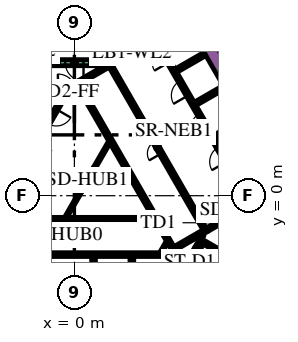
"""IFC4 building model, lengths in metres.
Left out: names, types, materials, properties, quantities, classifications, styles, units other than length and angle.
Written with IfcOpenShell. Run it as: python <this file> out.ifc"""

import sys

from ifc_helpers import new_model, si_unit, direction, frame, frame_2d, origin, place, context, subcontext, project, spatial, polyline, rectangle, outline, extrude, element, fill, save


model = new_model("IFC4")
c1 = context("Model", 3, precision=1e-05, world=origin(), true_north=direction((0.0, 1.0)))
c2 = subcontext(c1, "Body", "Model", "MODEL_VIEW")
j1 = project(units=[si_unit("LENGTHUNIT", "METRE"), si_unit("PLANEANGLEUNIT", "RADIAN")], contexts=[c1])
p1 = place(None, origin())
s1 = spatial("IfcSite", under=j1, at=p1, CompositionType="ELEMENT")
p2 = place(p1, origin())
s2 = spatial("IfcBuilding", under=s1, at=p2, CompositionType="ELEMENT")
p3 = place(p2, frame((0.0, 0.0, 21.6)))
s3 = spatial("IfcBuildingStorey", under=s2, at=p3, CompositionType="ELEMENT", Elevation=21.6)
p4 = place(p3, frame((6.776, 13.364, 0.0), z_axis=(0.0, 0.0, 1.0), x_axis=(0.500004177138, -0.8660229921, 0.0)))
e1 = element("IfcWall", 1, at=p4, inside=s3, PredefinedType="SOLIDWALL", context=c2, shape_type="SweptSolid", body=[
    extrude(rectangle(XDim=20.204, YDim=0.9, at=frame_2d((10.102, 0.0))), origin(), (0.0, 0.0, 1.0), 6.0),
])
p5 = place(p3, frame((8.334, -2.964, 0.0), z_axis=(0.0, 0.0, 1.0), x_axis=(0.866016039709, -0.500016218704, 0.0)))
e2 = element("IfcWall", 2, at=p5, inside=s3, PredefinedType="SOLIDWALL", context=c2, shape_type="SweptSolid", body=[
    extrude(rectangle(XDim=7.05, YDim=0.25, at=frame_2d((3.525, 0.0))), origin(), (0.0, 0.0, 1.0), 6.0),
])
p6 = place(p3, frame((8.168, -3.503, 0.0), z_axis=(0.0, 0.0, 1.0), x_axis=(0.49972245349, 0.866185586049, 0.0)))
e3 = element("IfcWall", 3, at=p6, inside=s3, PredefinedType="SOLIDWALL", context=c2, shape_type="SweptSolid", body=[
    extrude(rectangle(XDim=0.425, YDim=0.25, at=frame_2d((0.212, 0.0))), origin(), (0.0, 0.0, 1.0), 6.0),
])
p7 = place(p3, frame((1.6, 8.95, 0.0), z_axis=(0.0, 0.0, 1.0), x_axis=(0.0, 1.0, 0.0)))
e4 = element("IfcWall", 4, at=p7, inside=s3, PredefinedType="SOLIDWALL", context=c2, shape_type="SweptSolid", body=[
    extrude(rectangle(XDim=6.8, YDim=0.25, at=frame_2d((3.4, 0.0))), origin(), (0.0, 0.0, 1.0), 6.0),
])
p8 = place(p3, frame((1.05, 8.825, 0.0), z_axis=(0.0, 0.0, 1.0), x_axis=(1.0, 0.0, 0.0)))
e5 = element("IfcWall", 5, at=p8, inside=s3, PredefinedType="SOLIDWALL", context=c2, shape_type="SweptSolid", body=[
    extrude(rectangle(XDim=0.675, YDim=0.25, at=frame_2d((0.337, 0.0))), origin(), (0.0, 0.0, 1.0), 6.0),
])
p9 = place(p3, frame((-1.6, 8.7, 0.0), z_axis=(0.0, 0.0, 1.0), x_axis=(0.0, 1.0, 0.0)))
e6 = element("IfcWall", 6, at=p9, inside=s3, PredefinedType="SOLIDWALL", context=c2, shape_type="SweptSolid", body=[
    extrude(rectangle(XDim=7.05, YDim=0.25, at=frame_2d((3.525, 0.0))), origin(), (0.0, 0.0, 1.0), 6.0),
])
p10 = place(p3, frame((-1.475, 8.825, 0.0), z_axis=(0.0, 0.0, 1.0), x_axis=(1.0, 0.0, 0.0)))
e7 = element("IfcWall", 7, at=p10, inside=s3, PredefinedType="SOLIDWALL", context=c2, shape_type="SweptSolid", body=[
    extrude(rectangle(XDim=0.425, YDim=0.25, at=frame_2d((0.212, 0.0))), origin(), (0.0, 0.0, 1.0), 6.0),
])
p11 = place(p3, frame((-5.545, -3.875, 0.0), z_axis=(0.0, 0.0, 1.0), x_axis=(1.0, 0.0, 0.0)))
e8 = element("IfcWall", 8, at=p11, inside=s3, PredefinedType="SOLIDWALL", context=c2, shape_type="SweptSolid", body=[
    extrude(rectangle(XDim=11.97, YDim=0.25, at=frame_2d((5.985, 0.0))), origin(), (0.0, 0.0, 1.0), 6.0),
])
p12 = place(p3, frame((6.3, -7.268, 0.0), z_axis=(0.0, 0.0, 1.0), x_axis=(0.0, 1.0, 0.0)))
e9 = element("IfcWall", 9, at=p12, inside=s3, PredefinedType="SOLIDWALL", context=c2, shape_type="SweptSolid", body=[
    extrude(rectangle(XDim=3.268, YDim=0.25, at=frame_2d((1.634, 0.0))), origin(), (0.0, 0.0, 1.0), 6.0),
])
for number, where, z_axis, x_axis in (
    (10, (3.78, -4.0, 0.0), (0.0, 0.0, 1.0), (0.0, -1.0, 0.0)),
    (11, (1.26, -4.0, 0.0), (0.0, 0.0, 1.0), (0.0, -1.0, 0.0)),
):
    element("IfcWall", number, at=place(p3, frame(where, z_axis=z_axis, x_axis=x_axis)), inside=s3, PredefinedType="SOLIDWALL", context=c2, shape_type="SweptSolid", body=[
        extrude(rectangle(XDim=2.2, YDim=0.25, at=frame_2d((1.1, 0.0))), origin(), (0.0, 0.0, 1.0), 6.0),
    ])
p13 = place(p3, origin())
e12 = element("IfcWall", 12, at=p13, inside=s3, PredefinedType="SOLIDWALL", context=c2, shape_type="SweptSolid", body=[
    extrude(outline(polyline([(0.566, 6.725), (0.566, 6.875), (0.566, 6.875), (0.565, 6.875), (0.361, 6.875), (0.035, 7.439), (0.252, 7.564), (0.377, 7.348), (6.552, -3.348), (6.677, -3.564), (6.46, -3.689), (0.448, 6.725), (0.565, 6.725), (0.566, 6.725), (0.566, 6.725)])), origin(), (0.0, 0.0, 1.0), 6.0),
])
p14 = place(p3, frame((0.314, 7.456, 0.0), z_axis=(0.0, 0.0, 1.0), x_axis=(0.866013897511, 0.50001992892, 0.0)))
e13 = element("IfcWall", 13, at=p14, inside=s3, PredefinedType="SOLIDWALL", context=c2, shape_type="SweptSolid", body=[
    extrude(rectangle(XDim=3.268, YDim=0.25, at=frame_2d((1.634, 0.0))), origin(), (0.0, 0.0, 1.0), 6.0),
])
p15 = place(p3, frame((6.614, -3.456, 0.0), z_axis=(0.0, 0.0, 1.0), x_axis=(0.866031582473, 0.499989298045, 0.0)))
e14 = element("IfcWall", 14, at=p15, inside=s3, PredefinedType="SOLIDWALL", context=c2, shape_type="SweptSolid", body=[
    extrude(rectangle(XDim=2.455, YDim=0.25, at=frame_2d((1.228, 0.0))), origin(), (0.0, 0.0, 1.0), 6.0),
])
for number, where, z_axis, x_axis in (
    (15, (6.684, 8.224, 0.0), (0.0, 0.0, 1.0), (0.866, 0.5, 0.0)),
    (16, (7.944, 6.041, 0.0), (0.0, 0.0, 1.0), (0.866, 0.5, 0.0)),
    (17, (9.204, 3.859, 0.0), (0.0, 0.0, 1.0), (0.866, 0.5, 0.0)),
):
    element("IfcWall", number, at=place(p3, frame(where, z_axis=z_axis, x_axis=x_axis)), inside=s3, PredefinedType="SOLIDWALL", context=c2, shape_type="SweptSolid", body=[
        extrude(rectangle(XDim=2.2, YDim=0.25, at=frame_2d((1.1, 0.0))), origin(), (0.0, 0.0, 1.0), 6.0),
    ])
p16 = place(p3, frame((-0.728, 6.24, 0.0), z_axis=(0.0, 0.0, 1.0), x_axis=(-0.865955664968, 0.500120771724, 0.0)))
e18 = element("IfcWall", 18, at=p16, inside=s3, PredefinedType="SOLIDWALL", context=c2, shape_type="SweptSolid", body=[
    extrude(rectangle(XDim=0.778, YDim=0.25, at=frame_2d((0.389, 0.0))), origin(), (0.0, 0.0, 1.0), 6.0),
])
p17 = place(p3, frame((-2.196, 8.625, 0.0), z_axis=(0.0, 0.0, 1.0), x_axis=(1.0, 0.0, 0.0)))
e19 = element("IfcWall", 19, at=p17, inside=s3, PredefinedType="PARTITIONING", context=c2, shape_type="SweptSolid", body=[
    extrude(rectangle(XDim=1.146, YDim=0.15, at=frame_2d((0.573, 0.0))), origin(), (0.0, 0.0, 1.0), 4.85),
])
p18 = place(p3, frame((5.705, -3.718, 0.0), z_axis=(0.0, 0.0, 1.0), x_axis=(0.499962090823, 0.866047289552, 0.0)))
e20 = element("IfcWall", 20, at=p18, inside=s3, PredefinedType="PARTITIONING", context=c2, shape_type="SweptSolid", body=[
    extrude(rectangle(XDim=0.735, YDim=0.15, at=frame_2d((0.367, 0.0))), origin(), (0.0, 0.0, 1.0), 4.85),
])
p19 = place(p3, frame((8.459, -2.599, 0.0), z_axis=(0.0, 0.0, 1.0), x_axis=(-0.500041054325, -0.866001699761, 0.0)))
e21 = element("IfcWall", 21, at=p19, inside=s3, PredefinedType="PARTITIONING", context=c2, shape_type="SweptSolid", body=[
    extrude(rectangle(XDim=0.929, YDim=0.15, at=frame_2d((0.464, 0.0))), origin(), (0.0, 0.0, 1.0), 6.0),
])
p20 = place(p3, frame((-4.2, -1.5, 0.0), z_axis=(0.0, 0.0, 1.0), x_axis=(1.0, 0.0, 0.0)))
e22 = element("IfcWall", 22, at=p20, inside=s3, PredefinedType="PARTITIONING", context=c2, shape_type="SweptSolid", body=[
    extrude(rectangle(XDim=9.359, YDim=0.15, at=frame_2d((4.68, 0.0))), origin(), (0.0, 0.0, 1.0), 4.85),
])
p21 = place(p3, frame((-0.544, -1.393, 0.0), z_axis=(0.0, 0.0, 1.0), x_axis=(0.499928740635, 0.866066541489, 0.0)))
e23 = element("IfcWall", 23, at=p21, inside=s3, PredefinedType="PARTITIONING", context=c2, shape_type="SweptSolid", body=[
    extrude(rectangle(XDim=1.912, YDim=0.15, at=frame_2d((0.956, 0.0))), origin(), (0.0, 0.0, 1.0), 4.85),
])
p22 = place(p3, frame((1.312, 1.822, 0.0), z_axis=(0.0, 0.0, 1.0), x_axis=(0.500003549559, 0.866023354436, 0.0)))
e24 = element("IfcWall", 24, at=p22, inside=s3, PredefinedType="PARTITIONING", context=c2, shape_type="SweptSolid", body=[
    extrude(rectangle(XDim=1.93, YDim=0.15, at=frame_2d((0.965, 0.0))), origin(), (0.0, 0.0, 1.0), 4.85),
])
p23 = place(p3, frame((1.05, 8.625, 0.0), z_axis=(0.0, 0.0, 1.0), x_axis=(1.0, 0.0, 0.0)))
e25 = element("IfcWall", 25, at=p23, inside=s3, PredefinedType="PARTITIONING", context=c2, shape_type="SweptSolid", body=[
    extrude(rectangle(XDim=0.514, YDim=0.15, at=frame_2d((0.257, 0.0))), origin(), (0.0, 0.0, 1.0), 4.85),
])
p24 = place(p3, frame((11.553, -0.46, 0.0), z_axis=(0.0, 0.0, 1.0), x_axis=(-0.500006514828, 0.866021642414, 0.0)))
e26 = element("IfcWall", 26, at=p24, inside=s3, PredefinedType="SOLIDWALL", context=c2, shape_type="SweptSolid", body=[
    extrude(rectangle(XDim=12.35, YDim=0.25, at=frame_2d((6.175, 0.0))), origin(), (0.0, 0.0, 1.0), 6.0),
])
p25 = place(p24, frame((0.585, 0.0, 0.0)))
e27 = element("IfcOpeningElement", 27, at=p25, cuts=e26, PredefinedType="OPENING", context=c2, shape_type="SweptSolid", body=[
    extrude(rectangle(XDim=1.1, YDim=2.1, at=frame_2d((0.55, 1.05))), frame((0.0, 0.135, 0.0), z_axis=(0.0, -1.0, 0.0), x_axis=(1.0, 0.0, 0.0)), (0.0, 0.0, 1.0), 0.27),
])
p26 = place(p24, frame((3.105, 0.0, 0.0)))
e28 = element("IfcOpeningElement", 28, at=p26, cuts=e26, PredefinedType="OPENING", context=c2, shape_type="SweptSolid", body=[
    extrude(rectangle(XDim=1.1, YDim=2.1, at=frame_2d((0.55, 1.05))), frame((0.0, 0.135, 0.0), z_axis=(0.0, -1.0, 0.0), x_axis=(1.0, 0.0, 0.0)), (0.0, 0.0, 1.0), 0.27),
])
p27 = place(p24, frame((5.625, 0.0, 0.0)))
e29 = element("IfcOpeningElement", 29, at=p27, cuts=e26, PredefinedType="OPENING", context=c2, shape_type="SweptSolid", body=[
    extrude(rectangle(XDim=1.1, YDim=2.1, at=frame_2d((0.55, 1.05))), frame((0.0, 0.135, 0.0), z_axis=(0.0, -1.0, 0.0), x_axis=(1.0, 0.0, 0.0)), (0.0, 0.0, 1.0), 0.27),
])
p28 = place(p24, frame((8.145, 0.0, 0.0)))
e30 = element("IfcOpeningElement", 30, at=p28, cuts=e26, PredefinedType="OPENING", context=c2, shape_type="SweptSolid", body=[
    extrude(rectangle(XDim=1.1, YDim=2.1, at=frame_2d((0.55, 1.05))), frame((0.0, 0.135, 0.0), z_axis=(0.0, -1.0, 0.0), x_axis=(1.0, 0.0, 0.0)), (0.0, 0.0, 1.0), 0.27),
])
p29 = place(p24, frame((10.665, 0.0, 0.0)))
e31 = element("IfcOpeningElement", 31, at=p29, cuts=e26, PredefinedType="OPENING", context=c2, shape_type="SweptSolid", body=[
    extrude(rectangle(XDim=1.1, YDim=2.1, at=frame_2d((0.55, 1.05))), frame((0.0, 0.135, 0.0), z_axis=(0.0, -1.0, 0.0), x_axis=(1.0, 0.0, 0.0)), (0.0, 0.0, 1.0), 0.27),
])
p30 = place(p3, frame((8.565, -2.185, 0.0), z_axis=(0.0, 0.0, 1.0), x_axis=(-0.499997954832, 0.866026584559, 0.0)))
e32 = element("IfcWall", 32, at=p30, inside=s3, PredefinedType="SOLIDWALL", context=c2, shape_type="SweptSolid", body=[
    extrude(rectangle(XDim=12.35, YDim=0.25, at=frame_2d((6.175, 0.0))), origin(), (0.0, 0.0, 1.0), 6.0),
])
p31 = place(p30, frame((5.725, 0.0, 0.0)))
e33 = element("IfcOpeningElement", 33, at=p31, cuts=e32, PredefinedType="OPENING", context=c2, shape_type="SweptSolid", body=[
    extrude(rectangle(XDim=0.9, YDim=2.1, at=frame_2d((0.45, 1.05))), frame((0.0, 0.135, 0.0), z_axis=(0.0, -1.0, 0.0), x_axis=(1.0, 0.0, 0.0)), (0.0, 0.0, 1.0), 0.27),
])
p32 = place(p3, frame((-0.898, 6.194, 0.0), z_axis=(0.0, 0.0, 1.0), x_axis=(-0.499996202215, -0.866027596426, 0.0)))
e34 = element("IfcWall", 34, at=p32, inside=s3, PredefinedType="SOLIDWALL", context=c2, shape_type="SweptSolid", body=[
    extrude(rectangle(XDim=9.83, YDim=0.25, at=frame_2d((4.915, 0.0))), origin(), (0.0, 0.0, 1.0), 6.0),
])
p33 = place(p32, frame((0.585, 0.0, 0.0)))
e35 = element("IfcOpeningElement", 35, at=p33, cuts=e34, PredefinedType="OPENING", context=c2, shape_type="SweptSolid", body=[
    extrude(rectangle(XDim=1.1, YDim=2.1, at=frame_2d((0.55, 1.05))), frame((0.0, 0.135, 0.0), z_axis=(0.0, -1.0, 0.0), x_axis=(1.0, 0.0, 0.0)), (0.0, 0.0, 1.0), 0.27),
])
p34 = place(p32, frame((3.105, 0.0, 0.0)))
e36 = element("IfcOpeningElement", 36, at=p34, cuts=e34, PredefinedType="OPENING", context=c2, shape_type="SweptSolid", body=[
    extrude(rectangle(XDim=1.1, YDim=2.1, at=frame_2d((0.55, 1.05))), frame((0.0, 0.135, 0.0), z_axis=(0.0, -1.0, 0.0), x_axis=(1.0, 0.0, 0.0)), (0.0, 0.0, 1.0), 0.27),
])
p35 = place(p32, frame((5.625, 0.0, 0.0)))
e37 = element("IfcOpeningElement", 37, at=p35, cuts=e34, PredefinedType="OPENING", context=c2, shape_type="SweptSolid", body=[
    extrude(rectangle(XDim=1.1, YDim=2.1, at=frame_2d((0.55, 1.05))), frame((0.0, 0.135, 0.0), z_axis=(0.0, -1.0, 0.0), x_axis=(1.0, 0.0, 0.0)), (0.0, 0.0, 1.0), 0.27),
])
p36 = place(p32, frame((8.145, 0.0, 0.0)))
e38 = element("IfcOpeningElement", 38, at=p36, cuts=e34, PredefinedType="OPENING", context=c2, shape_type="SweptSolid", body=[
    extrude(rectangle(XDim=1.1, YDim=2.1, at=frame_2d((0.55, 1.05))), frame((0.0, 0.135, 0.0), z_axis=(0.0, -1.0, 0.0), x_axis=(1.0, 0.0, 0.0)), (0.0, 0.0, 1.0), 0.27),
])
p37 = place(p3, frame((7.053, -5.284, 0.0), z_axis=(0.0, 0.0, 1.0), x_axis=(0.500078061341, 0.865980330357, 0.0)))
e39 = element("IfcWall", 39, at=p37, inside=s3, PredefinedType="SOLIDWALL", context=c2, shape_type="SweptSolid", body=[
    extrude(rectangle(XDim=2.1, YDim=0.4, at=frame_2d((1.05, 0.0))), origin(), (0.0, 0.0, 1.0), 6.0),
])
p38 = place(p37, frame((0.45, 0.0, 0.0)))
e40 = element("IfcOpeningElement", 40, at=p38, cuts=e39, PredefinedType="OPENING", context=c2, shape_type="SweptSolid", body=[
    extrude(rectangle(XDim=1.2, YDim=2.1, at=frame_2d((0.6, 1.05))), frame((0.0, 0.21, 0.0), z_axis=(0.0, -1.0, 0.0), x_axis=(1.0, 0.0, 0.0)), (0.0, 0.0, 1.0), 0.42),
])
p39 = place(p3, frame((8.74, -2.229, 0.0), z_axis=(0.0, 0.0, 1.0), x_axis=(0.865989075817, 0.500062916607, 0.0)))
e41 = element("IfcWall", 41, at=p39, inside=s3, PredefinedType="SOLIDWALL", context=c2, shape_type="SweptSolid", body=[
    extrude(rectangle(XDim=1.8, YDim=0.25, at=frame_2d((0.9, 0.0))), origin(), (0.0, 0.0, 1.0), 6.0),
])
p40 = place(p39, frame((0.45, 0.0, 0.0)))
e42 = element("IfcOpeningElement", 42, at=p40, cuts=e41, PredefinedType="OPENING", context=c2, shape_type="SweptSolid", body=[
    extrude(rectangle(XDim=0.9, YDim=2.1, at=frame_2d((0.45, 1.05))), frame((0.0, 0.135, 0.0), z_axis=(0.0, -1.0, 0.0), x_axis=(1.0, 0.0, 0.0)), (0.0, 0.0, 1.0), 0.27),
])
p41 = place(p3, frame((1.05, 8.75, 0.0), z_axis=(0.0, 0.0, 1.0), x_axis=(-1.0, 0.0, 0.0)))
e43 = element("IfcWall", 43, at=p41, inside=s3, PredefinedType="SOLIDWALL", context=c2, shape_type="SweptSolid", body=[
    extrude(rectangle(XDim=2.1, YDim=0.4, at=frame_2d((1.05, 0.0))), origin(), (0.0, 0.0, 1.0), 6.0),
])
p42 = place(p41, frame((0.45, 0.0, 0.0)))
e44 = element("IfcOpeningElement", 44, at=p42, cuts=e43, PredefinedType="OPENING", context=c2, shape_type="SweptSolid", body=[
    extrude(rectangle(XDim=1.2, YDim=2.1, at=frame_2d((0.6, 1.05))), frame((0.0, 0.21, 0.0), z_axis=(0.0, -1.0, 0.0), x_axis=(1.0, 0.0, 0.0)), (0.0, 0.0, 1.0), 0.42),
])
p43 = place(p3, frame((-1.76, -3.498, 0.0), z_axis=(0.0, 0.0, 1.0), x_axis=(0.499977374825, 0.866038466041, 0.0)))
e45 = element("IfcWall", 45, at=p43, inside=s3, PredefinedType="PARTITIONING", context=c2, shape_type="SweptSolid", body=[
    extrude(rectangle(XDim=2.1, YDim=0.15, at=frame_2d((1.05, 0.0))), origin(), (0.0, 0.0, 1.0), 4.85),
])
p44 = place(p43, frame((0.6, 0.0, 0.0)))
e46 = element("IfcOpeningElement", 46, at=p44, cuts=e45, PredefinedType="OPENING", context=c2, shape_type="SweptSolid", body=[
    extrude(rectangle(XDim=0.9, YDim=2.1, at=frame_2d((0.45, 1.05))), frame((0.0, 0.085, 0.0), z_axis=(0.0, -1.0, 0.0), x_axis=(1.0, 0.0, 0.0)), (0.0, 0.0, 1.0), 0.17),
])
p45 = place(p3, frame((-1.534, 6.8, 0.0), z_axis=(0.0, 0.0, 1.0), x_axis=(1.0, 0.0, 0.0)))
e47 = element("IfcWall", 47, at=p45, inside=s3, PredefinedType="PARTITIONING", context=c2, shape_type="SweptSolid", body=[
    extrude(rectangle(XDim=2.1, YDim=0.15, at=frame_2d((1.05, 0.0))), origin(), (0.0, 0.0, 1.0), 4.85),
])
p46 = place(p45, frame((0.45, 0.0, 0.0)))
e48 = element("IfcOpeningElement", 48, at=p46, cuts=e47, PredefinedType="OPENING", context=c2, shape_type="SweptSolid", body=[
    extrude(rectangle(XDim=1.2, YDim=2.1, at=frame_2d((0.6, 1.05))), frame((0.0, 0.085, 0.0), z_axis=(0.0, -1.0, 0.0), x_axis=(1.0, 0.0, 0.0)), (0.0, 0.0, 1.0), 0.17),
])
p47 = place(p3, frame((3.183, 9.02, 0.0), z_axis=(0.0, 0.0, 1.0), x_axis=(0.866034573852, 0.49998411664, 0.0)))
e49 = element("IfcWall", 49, at=p47, inside=s3, PredefinedType="PARTITIONING", context=c2, shape_type="SweptSolid", body=[
    extrude(rectangle(XDim=1.4, YDim=0.09, at=frame_2d((0.7, 0.0))), origin(), (0.0, 0.0, 1.0), 4.85),
])
p48 = place(p47, frame((0.1, 0.0, 0.0)))
e50 = element("IfcOpeningElement", 50, at=p48, cuts=e49, PredefinedType="OPENING", context=c2, shape_type="SweptSolid", body=[
    extrude(rectangle(XDim=1.2, YDim=2.1, at=frame_2d((0.6, 1.05))), frame((0.0, 0.055, 0.0), z_axis=(0.0, -1.0, 0.0), x_axis=(1.0, 0.0, 0.0)), (0.0, 0.0, 1.0), 0.11),
])
p49 = place(p3, frame((0.412, 0.263, 0.0), z_axis=(0.0, 0.0, 1.0), x_axis=(0.500062916607, 0.865989075817, 0.0)))
e51 = element("IfcWall", 51, at=p49, inside=s3, PredefinedType="PARTITIONING", context=c2, shape_type="SweptSolid", body=[
    extrude(rectangle(XDim=1.8, YDim=0.15, at=frame_2d((0.9, 0.0))), origin(), (0.0, 0.0, 1.0), 4.85),
])
p50 = place(p49, frame((0.45, 0.0, 0.0)))
e52 = element("IfcOpeningElement", 52, at=p50, cuts=e51, PredefinedType="OPENING", context=c2, shape_type="SweptSolid", body=[
    extrude(rectangle(XDim=0.9, YDim=2.1, at=frame_2d((0.45, 1.05))), frame((0.0, 0.085, 0.0), z_axis=(0.0, -1.0, 0.0), x_axis=(1.0, 0.0, 0.0)), (0.0, 0.0, 1.0), 0.17),
])
p51 = place(p3, frame((38.25, -14.145, 0.0), z_axis=(0.0, 0.0, 1.0), x_axis=(-0.500000527961, 0.866025098966, 0.0)))
e53 = element("IfcWall", 53, at=p51, inside=s3, PredefinedType="SOLIDWALL", context=c2, shape_type="SweptSolid", body=[
    extrude(rectangle(XDim=62.75, YDim=0.25, at=frame_2d((31.375, 0.0))), origin(), (0.0, 0.0, 1.0), 4.5),
])
p52 = place(p26, origin())
e54 = element("IfcDoor", 54, at=p52, inside=s3, OperationType="DOUBLE_DOOR_SLIDING", PredefinedType="DOOR", context=c2, shape_type="SweptSolid", body=[
    extrude(rectangle(XDim=1.1, YDim=2.1, at=frame_2d((0.55, 1.05))), frame((0.0, 0.025, 0.0), z_axis=(0.0, -1.0, 0.0), x_axis=(1.0, 0.0, 0.0)), (0.0, 0.0, 1.0), 0.05),
])
fill(e28, e54)
p53 = place(p27, origin())
e55 = element("IfcDoor", 55, at=p53, inside=s3, OperationType="DOUBLE_DOOR_SLIDING", PredefinedType="DOOR", context=c2, shape_type="SweptSolid", body=[
    extrude(rectangle(XDim=1.1, YDim=2.1, at=frame_2d((0.55, 1.05))), frame((0.0, 0.025, 0.0), z_axis=(0.0, -1.0, 0.0), x_axis=(1.0, 0.0, 0.0)), (0.0, 0.0, 1.0), 0.05),
])
fill(e29, e55)
p54 = place(p28, origin())
e56 = element("IfcDoor", 56, at=p54, inside=s3, OperationType="DOUBLE_DOOR_SLIDING", PredefinedType="DOOR", context=c2, shape_type="SweptSolid", body=[
    extrude(rectangle(XDim=1.1, YDim=2.1, at=frame_2d((0.55, 1.05))), frame((0.0, 0.025, 0.0), z_axis=(0.0, -1.0, 0.0), x_axis=(1.0, 0.0, 0.0)), (0.0, 0.0, 1.0), 0.05),
])
fill(e30, e56)
p55 = place(p29, origin())
e57 = element("IfcDoor", 57, at=p55, inside=s3, OperationType="DOUBLE_DOOR_SLIDING", PredefinedType="DOOR", context=c2, shape_type="SweptSolid", body=[
    extrude(rectangle(XDim=1.1, YDim=2.1, at=frame_2d((0.55, 1.05))), frame((0.0, 0.025, 0.0), z_axis=(0.0, -1.0, 0.0), x_axis=(1.0, 0.0, 0.0)), (0.0, 0.0, 1.0), 0.05),
])
fill(e31, e57)
p56 = place(p31, origin())
e58 = element("IfcDoor", 58, at=p56, inside=s3, OperationType="SINGLE_SWING_LEFT", PredefinedType="DOOR", context=c2, shape_type="SweptSolid", body=[
    extrude(rectangle(XDim=0.9, YDim=2.1, at=frame_2d((0.45, 1.05))), frame((0.0, 0.025, 0.0), z_axis=(0.0, -1.0, 0.0), x_axis=(1.0, 0.0, 0.0)), (0.0, 0.0, 1.0), 0.05),
])
fill(e33, e58)
p57 = place(p33, origin())
e59 = element("IfcDoor", 59, at=p57, inside=s3, OperationType="DOUBLE_DOOR_SLIDING", PredefinedType="DOOR", context=c2, shape_type="SweptSolid", body=[
    extrude(rectangle(XDim=1.1, YDim=2.1, at=frame_2d((0.55, 1.05))), frame((0.0, 0.025, 0.0), z_axis=(0.0, -1.0, 0.0), x_axis=(1.0, 0.0, 0.0)), (0.0, 0.0, 1.0), 0.05),
])
fill(e35, e59)
p58 = place(p38, origin())
e60 = element("IfcDoor", 60, at=p58, inside=s3, OperationType="SINGLE_SWING_LEFT", PredefinedType="DOOR", context=c2, shape_type="SweptSolid", body=[
    extrude(rectangle(XDim=1.2, YDim=2.1, at=frame_2d((0.6, 1.05))), frame((0.0, 0.025, 0.0), z_axis=(0.0, -1.0, 0.0), x_axis=(1.0, 0.0, 0.0)), (0.0, 0.0, 1.0), 0.05),
])
fill(e40, e60)
p59 = place(p40, origin())
e61 = element("IfcDoor", 61, at=p59, inside=s3, OperationType="SINGLE_SWING_LEFT", PredefinedType="DOOR", context=c2, shape_type="SweptSolid", body=[
    extrude(rectangle(XDim=0.9, YDim=2.1, at=frame_2d((0.45, 1.05))), frame((0.0, 0.025, 0.0), z_axis=(0.0, -1.0, 0.0), x_axis=(1.0, 0.0, 0.0)), (0.0, 0.0, 1.0), 0.05),
])
fill(e42, e61)
p60 = place(p42, origin())
e62 = element("IfcDoor", 62, at=p60, inside=s3, OperationType="SINGLE_SWING_LEFT", PredefinedType="DOOR", context=c2, shape_type="SweptSolid", body=[
    extrude(rectangle(XDim=1.2, YDim=2.1, at=frame_2d((0.6, 1.05))), frame((0.0, 0.025, 0.0), z_axis=(0.0, -1.0, 0.0), x_axis=(1.0, 0.0, 0.0)), (0.0, 0.0, 1.0), 0.05),
])
fill(e44, e62)
p61 = place(p44, origin())
e63 = element("IfcDoor", 63, at=p61, inside=s3, OperationType="SINGLE_SWING_LEFT", PredefinedType="DOOR", context=c2, shape_type="SweptSolid", body=[
    extrude(rectangle(XDim=0.9, YDim=2.1, at=frame_2d((0.45, 1.05))), frame((0.0, 0.025, 0.0), z_axis=(0.0, -1.0, 0.0), x_axis=(1.0, 0.0, 0.0)), (0.0, 0.0, 1.0), 0.05),
])
fill(e46, e63)
p62 = place(p46, origin())
e64 = element("IfcDoor", 64, at=p62, inside=s3, OperationType="SINGLE_SWING_LEFT", PredefinedType="DOOR", context=c2, shape_type="SweptSolid", body=[
    extrude(rectangle(XDim=1.2, YDim=2.1, at=frame_2d((0.6, 1.05))), frame((0.0, 0.025, 0.0), z_axis=(0.0, -1.0, 0.0), x_axis=(1.0, 0.0, 0.0)), (0.0, 0.0, 1.0), 0.05),
])
fill(e48, e64)
p63 = place(p48, origin())
e65 = element("IfcDoor", 65, at=p63, inside=s3, OperationType="SINGLE_SWING_LEFT", PredefinedType="DOOR", context=c2, shape_type="SweptSolid", body=[
    extrude(rectangle(XDim=1.2, YDim=2.1, at=frame_2d((0.6, 1.05))), frame((0.0, 0.025, 0.0), z_axis=(0.0, -1.0, 0.0), x_axis=(1.0, 0.0, 0.0)), (0.0, 0.0, 1.0), 0.05),
])
fill(e50, e65)
p64 = place(p50, origin())
e66 = element("IfcDoor", 66, at=p64, inside=s3, OperationType="SINGLE_SWING_LEFT", PredefinedType="DOOR", context=c2, shape_type="SweptSolid", body=[
    extrude(rectangle(XDim=0.9, YDim=2.1, at=frame_2d((0.45, 1.05))), frame((0.0, 0.025, 0.0), z_axis=(0.0, -1.0, 0.0), x_axis=(1.0, 0.0, 0.0)), (0.0, 0.0, 1.0), 0.05),
])
fill(e52, e66)
save(model, sys.argv[1])
